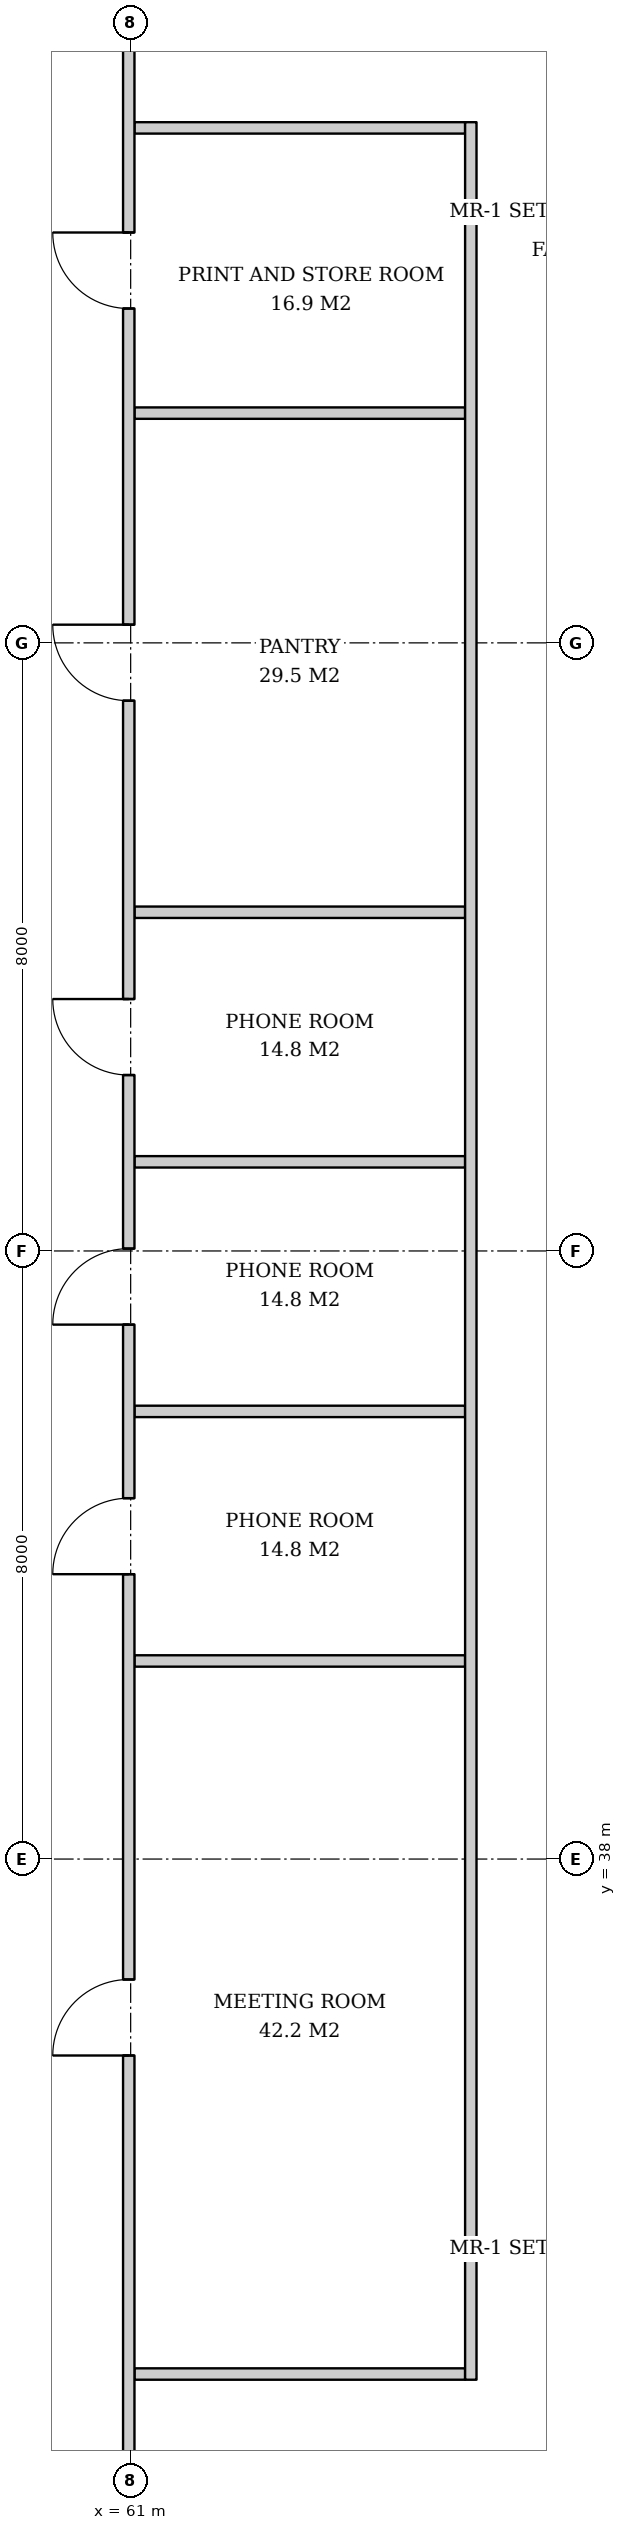
"""IFC4 building model, lengths in metres.
Left out: names, types, materials, properties, quantities, classifications, styles, units other than length and angle.
Written with IfcOpenShell. Run it as: python <this file> out.ifc"""

import sys

from ifc_helpers import new_model, si_unit, direction, frame, frame_2d, origin, place, context, subcontext, project, spatial, rectangle, extrude, element, fill, save


model = new_model("IFC4")
c1 = context("Model", 3, precision=1e-05, world=origin(), true_north=direction((0.0, 1.0)))
c2 = subcontext(c1, "Body", "Model", "MODEL_VIEW")
j1 = project(units=[si_unit("LENGTHUNIT", "METRE"), si_unit("PLANEANGLEUNIT", "RADIAN")], contexts=[c1])
p1 = place(None, origin())
s1 = spatial("IfcSite", under=j1, at=p1, CompositionType="ELEMENT")
p2 = place(p1, origin())
s2 = spatial("IfcBuilding", under=s1, at=p2, CompositionType="ELEMENT")
p3 = place(p2, frame((0.0, 0.0, 36.2)))
s3 = spatial("IfcBuildingStorey", under=s2, at=p3, CompositionType="ELEMENT", Elevation=36.2)
for number, where, z_axis, x_axis in (
    (1, (61.05, 31.225, 0.0), (0.0, 0.0, 1.0), (1.0, 0.0, 0.0)),
    (2, (61.05, 40.606, 0.0), (0.0, 0.0, 1.0), (1.0, 0.0, 0.0)),
    (3, (61.05, 43.889, 0.0), (0.0, 0.0, 1.0), (1.0, 0.0, 0.0)),
    (4, (61.05, 47.173, 0.0), (0.0, 0.0, 1.0), (1.0, 0.0, 0.0)),
    (5, (61.05, 50.456, 0.0), (0.0, 0.0, 1.0), (1.0, 0.0, 0.0)),
    (6, (61.05, 57.023, 0.0), (0.0, 0.0, 1.0), (1.0, 0.0, 0.0)),
    (7, (61.05, 60.775, 0.0), (0.0, 0.0, 1.0), (1.0, 0.0, 0.0)),
):
    element("IfcWall", number, at=place(p3, frame(where, z_axis=z_axis, x_axis=x_axis)), inside=s3, PredefinedType="PARTITIONING", context=c2, shape_type="SweptSolid", body=[
        extrude(rectangle(XDim=4.35, YDim=0.15, at=frame_2d((2.175, 0.0))), origin(), (0.0, 0.0, 1.0), 3.62),
    ])
p4 = place(p3, frame((65.475, 31.15, 0.0), z_axis=(0.0, 0.0, 1.0), x_axis=(0.0, 1.0, 0.0)))
e8 = element("IfcWall", 8, at=p4, inside=s3, PredefinedType="PARTITIONING", context=c2, shape_type="SweptSolid", body=[
    extrude(rectangle(XDim=29.7, YDim=0.15, at=frame_2d((14.85, 0.0))), origin(), (0.0, 0.0, 1.0), 2.612),
])
p5 = place(p3, frame((60.975, 29.95, 0.0), z_axis=(0.0, 0.0, 1.0), x_axis=(0.0, 1.0, 0.0)))
e9 = element("IfcWall", 9, at=p5, inside=s3, PredefinedType="PARTITIONING", context=c2, shape_type="SweptSolid", body=[
    extrude(rectangle(XDim=31.95, YDim=0.15, at=frame_2d((15.975, 0.0))), origin(), (0.0, 0.0, 1.0), 2.612),
])
p6 = place(p5, frame((5.466, 0.0, 0.0)))
e10 = element("IfcOpeningElement", 10, at=p6, cuts=e9, PredefinedType="OPENING", context=c2, shape_type="SweptSolid", body=[
    extrude(rectangle(XDim=1.0, YDim=2.1, at=frame_2d((0.5, 1.05))), frame((0.0, 0.085, 0.0), z_axis=(0.0, -1.0, 0.0), x_axis=(1.0, 0.0, 0.0)), (0.0, 0.0, 1.0), 0.17),
])
p7 = place(p5, frame((11.798, 0.0, 0.0)))
e11 = element("IfcOpeningElement", 11, at=p7, cuts=e9, PredefinedType="OPENING", context=c2, shape_type="SweptSolid", body=[
    extrude(rectangle(XDim=1.0, YDim=2.1, at=frame_2d((0.5, 1.05))), frame((0.0, 0.085, 0.0), z_axis=(0.0, -1.0, 0.0), x_axis=(1.0, 0.0, 0.0)), (0.0, 0.0, 1.0), 0.17),
])
p8 = place(p5, frame((15.081, 0.0, 0.0)))
e12 = element("IfcOpeningElement", 12, at=p8, cuts=e9, PredefinedType="OPENING", context=c2, shape_type="SweptSolid", body=[
    extrude(rectangle(XDim=1.0, YDim=2.1, at=frame_2d((0.5, 1.05))), frame((0.0, 0.085, 0.0), z_axis=(0.0, -1.0, 0.0), x_axis=(1.0, 0.0, 0.0)), (0.0, 0.0, 1.0), 0.17),
])
p9 = place(p5, frame((18.364, 0.0, 0.0)))
e13 = element("IfcOpeningElement", 13, at=p9, cuts=e9, PredefinedType="OPENING", context=c2, shape_type="SweptSolid", body=[
    extrude(rectangle(XDim=1.0, YDim=2.1, at=frame_2d((0.5, 1.05))), frame((0.0, 0.085, 0.0), z_axis=(0.0, -1.0, 0.0), x_axis=(1.0, 0.0, 0.0)), (0.0, 0.0, 1.0), 0.17),
])
p10 = place(p5, frame((23.289, 0.0, 0.0)))
e14 = element("IfcOpeningElement", 14, at=p10, cuts=e9, PredefinedType="OPENING", context=c2, shape_type="SweptSolid", body=[
    extrude(rectangle(XDim=1.0, YDim=2.1, at=frame_2d((0.5, 1.05))), frame((0.0, 0.085, 0.0), z_axis=(0.0, -1.0, 0.0), x_axis=(1.0, 0.0, 0.0)), (0.0, 0.0, 1.0), 0.17),
])
p11 = place(p5, frame((28.449, 0.0, 0.0)))
e15 = element("IfcOpeningElement", 15, at=p11, cuts=e9, PredefinedType="OPENING", context=c2, shape_type="SweptSolid", body=[
    extrude(rectangle(XDim=1.0, YDim=2.1, at=frame_2d((0.5, 1.05))), frame((0.0, 0.085, 0.0), z_axis=(0.0, -1.0, 0.0), x_axis=(1.0, 0.0, 0.0)), (0.0, 0.0, 1.0), 0.17),
])
p12 = place(p6, origin())
e16 = element("IfcDoor", 16, at=p12, inside=s3, OperationType="SINGLE_SWING_LEFT", PredefinedType="DOOR", context=c2, shape_type="SweptSolid", body=[
    extrude(rectangle(XDim=1.0, YDim=2.1, at=frame_2d((0.5, 1.05))), frame((0.0, 0.025, 0.0), z_axis=(0.0, -1.0, 0.0), x_axis=(1.0, 0.0, 0.0)), (0.0, 0.0, 1.0), 0.05),
])
fill(e10, e16)
p13 = place(p7, origin())
e17 = element("IfcDoor", 17, at=p13, inside=s3, OperationType="SINGLE_SWING_LEFT", PredefinedType="DOOR", context=c2, shape_type="SweptSolid", body=[
    extrude(rectangle(XDim=1.0, YDim=2.1, at=frame_2d((0.5, 1.05))), frame((0.0, 0.025, 0.0), z_axis=(0.0, -1.0, 0.0), x_axis=(1.0, 0.0, 0.0)), (0.0, 0.0, 1.0), 0.05),
])
fill(e11, e17)
p14 = place(p8, origin())
e18 = element("IfcDoor", 18, at=p14, inside=s3, OperationType="SINGLE_SWING_LEFT", PredefinedType="DOOR", context=c2, shape_type="SweptSolid", body=[
    extrude(rectangle(XDim=1.0, YDim=2.1, at=frame_2d((0.5, 1.05))), frame((0.0, 0.025, 0.0), z_axis=(0.0, -1.0, 0.0), x_axis=(1.0, 0.0, 0.0)), (0.0, 0.0, 1.0), 0.05),
])
fill(e12, e18)
p15 = place(p9, origin())
e19 = element("IfcDoor", 19, at=p15, inside=s3, OperationType="SINGLE_SWING_RIGHT", PredefinedType="DOOR", context=c2, shape_type="SweptSolid", body=[
    extrude(rectangle(XDim=1.0, YDim=2.1, at=frame_2d((0.5, 1.05))), frame((0.0, 0.025, 0.0), z_axis=(0.0, -1.0, 0.0), x_axis=(1.0, 0.0, 0.0)), (0.0, 0.0, 1.0), 0.05),
])
fill(e13, e19)
p16 = place(p10, origin())
e20 = element("IfcDoor", 20, at=p16, inside=s3, OperationType="SINGLE_SWING_RIGHT", PredefinedType="DOOR", context=c2, shape_type="SweptSolid", body=[
    extrude(rectangle(XDim=1.0, YDim=2.1, at=frame_2d((0.5, 1.05))), frame((0.0, 0.025, 0.0), z_axis=(0.0, -1.0, 0.0), x_axis=(1.0, 0.0, 0.0)), (0.0, 0.0, 1.0), 0.05),
])
fill(e14, e20)
p17 = place(p11, origin())
e21 = element("IfcDoor", 21, at=p17, inside=s3, OperationType="SINGLE_SWING_RIGHT", PredefinedType="DOOR", context=c2, shape_type="SweptSolid", body=[
    extrude(rectangle(XDim=1.0, YDim=2.1, at=frame_2d((0.5, 1.05))), frame((0.0, 0.025, 0.0), z_axis=(0.0, -1.0, 0.0), x_axis=(1.0, 0.0, 0.0)), (0.0, 0.0, 1.0), 0.05),
])
fill(e15, e21)
save(model, sys.argv[1])
